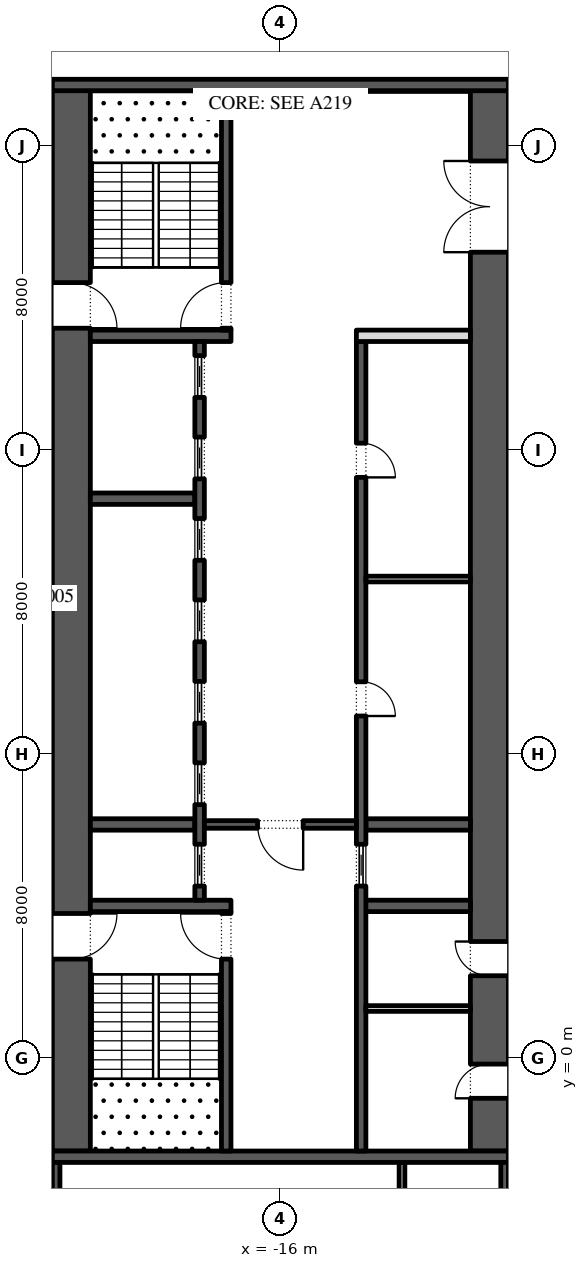
"""IFC4 building model, lengths in metres.
Left out: names, types, materials, properties, quantities, classifications, styles, units other than length and angle.
Written with IfcOpenShell. Run it as: python <this file> out.ifc"""

import sys

from ifc_helpers import new_model, si_unit, direction, frame, frame_2d, origin, place, context, subcontext, project, spatial, rectangle, extrude, element, fill, save


model = new_model("IFC4")
c1 = context("Model", 3, precision=1e-05, world=origin(), true_north=direction((0.0, 1.0)))
c2 = subcontext(c1, "Body", "Model", "MODEL_VIEW")
j1 = project(units=[si_unit("LENGTHUNIT", "METRE"), si_unit("PLANEANGLEUNIT", "RADIAN")], contexts=[c1])
p1 = place(None, origin())
s1 = spatial("IfcSite", under=j1, at=p1, CompositionType="ELEMENT")
p2 = place(p1, origin())
s2 = spatial("IfcBuilding", under=s1, at=p2, CompositionType="ELEMENT")
p3 = place(p2, frame((0.0, 0.0, 77.4)))
s3 = spatial("IfcBuildingStorey", under=s2, at=p3, CompositionType="ELEMENT", Elevation=77.4)
p4 = place(p3, frame((-21.5, -2.45, 0.0), z_axis=(0.0, 0.0, 1.0), x_axis=(0.0, 1.0, 0.0)))
e1 = element("IfcWall", 1, at=p4, inside=s3, PredefinedType="SHEAR", context=c2, shape_type="SweptSolid", body=[
    extrude(rectangle(XDim=27.9, YDim=1.0, at=frame_2d((13.95, 0.0))), origin(), (0.0, 0.0, 1.0), 4.0),
])
p5 = place(p4, frame((5.05, 0.0, 0.0)))
e2 = element("IfcOpeningElement", 2, at=p5, cuts=e1, PredefinedType="OPENING", context=c2, shape_type="SweptSolid", body=[
    extrude(rectangle(XDim=1.2, YDim=2.1, at=frame_2d((0.6, 1.05))), frame((0.0, 0.51, 0.0), z_axis=(0.0, -1.0, 0.0), x_axis=(1.0, 0.0, 0.0)), (0.0, 0.0, 1.0), 1.02),
])
p6 = place(p4, frame((21.65, 0.0, 0.0)))
e3 = element("IfcOpeningElement", 3, at=p6, cuts=e1, PredefinedType="OPENING", context=c2, shape_type="SweptSolid", body=[
    extrude(rectangle(XDim=1.2, YDim=2.1, at=frame_2d((0.6, 1.05))), frame((0.0, 0.51, 0.0), z_axis=(0.0, -1.0, 0.0), x_axis=(1.0, 0.0, 0.0)), (0.0, 0.0, 1.0), 1.02),
])
p7 = place(p3, frame((-10.5, -2.45, 0.0), z_axis=(0.0, 0.0, 1.0), x_axis=(0.0, 1.0, 0.0)))
e4 = element("IfcWall", 4, at=p7, inside=s3, PredefinedType="SHEAR", context=c2, shape_type="SweptSolid", body=[
    extrude(rectangle(XDim=27.9, YDim=1.0, at=frame_2d((13.95, 0.0))), origin(), (0.0, 0.0, 1.0), 4.0),
])
p8 = place(p7, frame((23.65, 0.0, 0.0)))
e5 = element("IfcOpeningElement", 5, at=p8, cuts=e4, PredefinedType="OPENING", context=c2, shape_type="SweptSolid", body=[
    extrude(rectangle(XDim=2.4, YDim=2.1, at=frame_2d((1.2, 1.05))), frame((0.0, 0.51, 0.0), z_axis=(0.0, -1.0, 0.0), x_axis=(1.0, 0.0, 0.0)), (0.0, 0.0, 1.0), 1.02),
])
p9 = place(p7, frame((1.387, 0.0, 0.0)))
e6 = element("IfcOpeningElement", 6, at=p9, cuts=e4, PredefinedType="OPENING", context=c2, shape_type="SweptSolid", body=[
    extrude(rectangle(XDim=0.9, YDim=2.1, at=frame_2d((0.45, 1.05))), frame((0.0, 0.51, 0.0), z_axis=(0.0, -1.0, 0.0), x_axis=(1.0, 0.0, 0.0)), (0.0, 0.0, 1.0), 1.02),
])
p10 = place(p7, frame((4.613, 0.0, 0.0)))
e7 = element("IfcOpeningElement", 7, at=p10, cuts=e4, PredefinedType="OPENING", context=c2, shape_type="SweptSolid", body=[
    extrude(rectangle(XDim=0.9, YDim=2.1, at=frame_2d((0.45, 1.05))), frame((0.0, 0.51, 0.0), z_axis=(0.0, -1.0, 0.0), x_axis=(1.0, 0.0, 0.0)), (0.0, 0.0, 1.0), 1.02),
])
for number, where, z_axis, x_axis in (
    (8, (-22.0, -2.6, 0.0), (0.0, 0.0, 1.0), (1.0, 0.0, 0.0)),
    (9, (-22.0, 25.6, 0.0), (0.0, 0.0, 1.0), (1.0, 0.0, 0.0)),
):
    element("IfcWall", number, at=place(p3, frame(where, z_axis=z_axis, x_axis=x_axis)), inside=s3, PredefinedType="SHEAR", context=c2, shape_type="SweptSolid", body=[
        extrude(rectangle(XDim=12.0, YDim=0.3, at=frame_2d((6.0, 0.0))), origin(), (0.0, 0.0, 1.0), 4.0),
    ])
p11 = place(p3, frame((-21.0, 4.0, 0.0), z_axis=(0.0, 0.0, 1.0), x_axis=(1.0, 0.0, 0.0)))
e10 = element("IfcWall", 10, at=p11, inside=s3, PredefinedType="SHEAR", context=c2, shape_type="SweptSolid", body=[
    extrude(rectangle(XDim=3.7, YDim=0.3, at=frame_2d((1.85, 0.0))), origin(), (0.0, 0.0, 1.0), 4.0),
])
p12 = place(p3, frame((-17.425, -2.45, 0.0), z_axis=(0.0, 0.0, 1.0), x_axis=(0.0, 1.0, 0.0)))
e11 = element("IfcWall", 11, at=p12, inside=s3, PredefinedType="SHEAR", context=c2, shape_type="SweptSolid", body=[
    extrude(rectangle(XDim=6.3, YDim=0.25, at=frame_2d((3.15, 0.0))), origin(), (0.0, 0.0, 1.0), 4.0),
])
p13 = place(p12, frame((5.05, 0.0, 0.0)))
e12 = element("IfcOpeningElement", 12, at=p13, cuts=e11, PredefinedType="OPENING", context=c2, shape_type="SweptSolid", body=[
    extrude(rectangle(XDim=1.2, YDim=2.1, at=frame_2d((0.6, 1.05))), frame((0.0, 0.135, 0.0), z_axis=(0.0, -1.0, 0.0), x_axis=(1.0, 0.0, 0.0)), (0.0, 0.0, 1.0), 0.27),
])
p14 = place(p3, frame((-21.0, 19.0, 0.0), z_axis=(0.0, 0.0, 1.0), x_axis=(1.0, 0.0, 0.0)))
e13 = element("IfcWall", 13, at=p14, inside=s3, PredefinedType="SHEAR", context=c2, shape_type="SweptSolid", body=[
    extrude(rectangle(XDim=3.7, YDim=0.3, at=frame_2d((1.85, 0.0))), origin(), (0.0, 0.0, 1.0), 4.0),
])
p15 = place(p3, frame((-17.425, 19.15, 0.0), z_axis=(0.0, 0.0, 1.0), x_axis=(0.0, 1.0, 0.0)))
e14 = element("IfcWall", 14, at=p15, inside=s3, PredefinedType="SHEAR", context=c2, shape_type="SweptSolid", body=[
    extrude(rectangle(XDim=6.3, YDim=0.25, at=frame_2d((3.15, 0.0))), origin(), (0.0, 0.0, 1.0), 4.0),
])
p16 = place(p15, frame((0.05, 0.0, 0.0)))
e15 = element("IfcOpeningElement", 15, at=p16, cuts=e14, PredefinedType="OPENING", context=c2, shape_type="SweptSolid", body=[
    extrude(rectangle(XDim=1.2, YDim=2.1, at=frame_2d((0.6, 1.05))), frame((0.0, 0.135, 0.0), z_axis=(0.0, -1.0, 0.0), x_axis=(1.0, 0.0, 0.0)), (0.0, 0.0, 1.0), 0.27),
])
for number, where, z_axis, x_axis in (
    (16, (-21.0, 6.143, 0.0), (0.0, 0.0, 1.0), (1.0, 0.0, 0.0)),
    (17, (-21.0, 14.714, 0.0), (0.0, 0.0, 1.0), (1.0, 0.0, 0.0)),
):
    element("IfcWall", number, at=place(p3, frame(where, z_axis=z_axis, x_axis=x_axis)), inside=s3, PredefinedType="SHEAR", context=c2, shape_type="SweptSolid", body=[
        extrude(rectangle(XDim=2.75, YDim=0.3, at=frame_2d((1.375, 0.0))), origin(), (0.0, 0.0, 1.0), 4.0),
    ])
p17 = place(p3, frame((-18.125, 4.15, 0.0), z_axis=(0.0, 0.0, 1.0), x_axis=(0.0, 1.0, 0.0)))
e18 = element("IfcWall", 18, at=p17, inside=s3, PredefinedType="SHEAR", context=c2, shape_type="SweptSolid", body=[
    extrude(rectangle(XDim=14.7, YDim=0.25, at=frame_2d((7.35, 0.0))), origin(), (0.0, 0.0, 1.0), 4.0),
])
p18 = place(p17, frame((0.371, 0.0, 0.0)))
e19 = element("IfcOpeningElement", 19, at=p18, cuts=e18, PredefinedType="OPENING", context=c2, shape_type="SweptSolid", body=[
    extrude(rectangle(XDim=1.1, YDim=2.1, at=frame_2d((0.55, 1.05))), frame((0.0, 0.135, 0.0), z_axis=(0.0, -1.0, 0.0), x_axis=(1.0, 0.0, 0.0)), (0.0, 0.0, 1.0), 0.27),
])
p19 = place(p17, frame((2.514, 0.0, 0.0)))
e20 = element("IfcOpeningElement", 20, at=p19, cuts=e18, PredefinedType="OPENING", context=c2, shape_type="SweptSolid", body=[
    extrude(rectangle(XDim=1.1, YDim=2.1, at=frame_2d((0.55, 1.05))), frame((0.0, 0.135, 0.0), z_axis=(0.0, -1.0, 0.0), x_axis=(1.0, 0.0, 0.0)), (0.0, 0.0, 1.0), 0.27),
])
p20 = place(p17, frame((4.657, 0.0, 0.0)))
e21 = element("IfcOpeningElement", 21, at=p20, cuts=e18, PredefinedType="OPENING", context=c2, shape_type="SweptSolid", body=[
    extrude(rectangle(XDim=1.1, YDim=2.1, at=frame_2d((0.55, 1.05))), frame((0.0, 0.135, 0.0), z_axis=(0.0, -1.0, 0.0), x_axis=(1.0, 0.0, 0.0)), (0.0, 0.0, 1.0), 0.27),
])
p21 = place(p17, frame((6.8, 0.0, 0.0)))
e22 = element("IfcOpeningElement", 22, at=p21, cuts=e18, PredefinedType="OPENING", context=c2, shape_type="SweptSolid", body=[
    extrude(rectangle(XDim=1.1, YDim=2.1, at=frame_2d((0.55, 1.05))), frame((0.0, 0.135, 0.0), z_axis=(0.0, -1.0, 0.0), x_axis=(1.0, 0.0, 0.0)), (0.0, 0.0, 1.0), 0.27),
])
p22 = place(p17, frame((8.943, 0.0, 0.0)))
e23 = element("IfcOpeningElement", 23, at=p22, cuts=e18, PredefinedType="OPENING", context=c2, shape_type="SweptSolid", body=[
    extrude(rectangle(XDim=1.1, YDim=2.1, at=frame_2d((0.55, 1.05))), frame((0.0, 0.135, 0.0), z_axis=(0.0, -1.0, 0.0), x_axis=(1.0, 0.0, 0.0)), (0.0, 0.0, 1.0), 0.27),
])
p23 = place(p17, frame((11.086, 0.0, 0.0)))
e24 = element("IfcOpeningElement", 24, at=p23, cuts=e18, PredefinedType="OPENING", context=c2, shape_type="SweptSolid", body=[
    extrude(rectangle(XDim=1.1, YDim=2.1, at=frame_2d((0.55, 1.05))), frame((0.0, 0.135, 0.0), z_axis=(0.0, -1.0, 0.0), x_axis=(1.0, 0.0, 0.0)), (0.0, 0.0, 1.0), 0.27),
])
p24 = place(p17, frame((13.229, 0.0, 0.0)))
e25 = element("IfcOpeningElement", 25, at=p24, cuts=e18, PredefinedType="OPENING", context=c2, shape_type="SweptSolid", body=[
    extrude(rectangle(XDim=1.1, YDim=2.1, at=frame_2d((0.55, 1.05))), frame((0.0, 0.135, 0.0), z_axis=(0.0, -1.0, 0.0), x_axis=(1.0, 0.0, 0.0)), (0.0, 0.0, 1.0), 0.27),
])
p25 = place(p3, frame((-14.0, 4.0, 0.0), z_axis=(0.0, 0.0, 1.0), x_axis=(1.0, 0.0, 0.0)))
e26 = element("IfcWall", 26, at=p25, inside=s3, PredefinedType="SHEAR", context=c2, shape_type="SweptSolid", body=[
    extrude(rectangle(XDim=3.0, YDim=0.3, at=frame_2d((1.5, 0.0))), origin(), (0.0, 0.0, 1.0), 4.0),
])
p26 = place(p3, frame((-13.75, 6.143, 0.0), z_axis=(0.0, 0.0, 1.0), x_axis=(1.0, 0.0, 0.0)))
e27 = element("IfcWall", 27, at=p26, inside=s3, PredefinedType="SHEAR", context=c2, shape_type="SweptSolid", body=[
    extrude(rectangle(XDim=2.75, YDim=0.3, at=frame_2d((1.375, 0.0))), origin(), (0.0, 0.0, 1.0), 4.0),
])
p27 = place(p3, frame((-13.875, -2.45, 0.0), z_axis=(0.0, 0.0, 1.0), x_axis=(0.0, 1.0, 0.0)))
e28 = element("IfcWall", 28, at=p27, inside=s3, PredefinedType="SHEAR", context=c2, shape_type="SweptSolid", body=[
    extrude(rectangle(XDim=21.3, YDim=0.25, at=frame_2d((10.65, 0.0))), origin(), (0.0, 0.0, 1.0), 4.0),
])
p28 = place(p27, frame((11.446, 0.0, 0.0)))
e29 = element("IfcOpeningElement", 29, at=p28, cuts=e28, PredefinedType="OPENING", context=c2, shape_type="SweptSolid", body=[
    extrude(rectangle(XDim=0.9, YDim=2.1, at=frame_2d((0.45, 1.05))), frame((0.0, 0.135, 0.0), z_axis=(0.0, -1.0, 0.0), x_axis=(1.0, 0.0, 0.0)), (0.0, 0.0, 1.0), 0.27),
])
p29 = place(p27, frame((17.725, 0.0, 0.0)))
e30 = element("IfcOpeningElement", 30, at=p29, cuts=e28, PredefinedType="OPENING", context=c2, shape_type="SweptSolid", body=[
    extrude(rectangle(XDim=0.9, YDim=2.1, at=frame_2d((0.45, 1.05))), frame((0.0, 0.135, 0.0), z_axis=(0.0, -1.0, 0.0), x_axis=(1.0, 0.0, 0.0)), (0.0, 0.0, 1.0), 0.27),
])
p30 = place(p27, frame((6.971, 0.0, 0.0)))
e31 = element("IfcOpeningElement", 31, at=p30, cuts=e28, PredefinedType="OPENING", context=c2, shape_type="SweptSolid", body=[
    extrude(rectangle(XDim=1.1, YDim=2.1, at=frame_2d((0.55, 1.05))), frame((0.0, 0.135, 0.0), z_axis=(0.0, -1.0, 0.0), x_axis=(1.0, 0.0, 0.0)), (0.0, 0.0, 1.0), 0.27),
])
p31 = place(p3, frame((-14.0, 19.0, 0.0), z_axis=(0.0, 0.0, 1.0), x_axis=(1.0, 0.0, 0.0)))
e32 = element("IfcWall", 32, at=p31, inside=s3, PredefinedType="PARTITIONING", context=c2, shape_type="SweptSolid", body=[
    extrude(rectangle(XDim=3.0, YDim=0.3, at=frame_2d((1.5, 0.0))), origin(), (0.0, 0.0, 1.0), 4.0),
])
p32 = place(p3, frame((-13.75, 12.6, 0.0), z_axis=(0.0, 0.0, 1.0), x_axis=(1.0, 0.0, 0.0)))
e33 = element("IfcWall", 33, at=p32, inside=s3, PredefinedType="PARTITIONING", context=c2, shape_type="SweptSolid", body=[
    extrude(rectangle(XDim=2.75, YDim=0.15, at=frame_2d((1.375, 0.0))), origin(), (0.0, 0.0, 1.0), 4.0),
])
p33 = place(p3, frame((-18.0, 6.143, 0.0), z_axis=(0.0, 0.0, 1.0), x_axis=(1.0, 0.0, 0.0)))
e34 = element("IfcWall", 34, at=p33, inside=s3, PredefinedType="SHEAR", context=c2, shape_type="SweptSolid", body=[
    extrude(rectangle(XDim=4.0, YDim=0.2, at=frame_2d((2.0, 0.0))), origin(), (0.0, 0.0, 1.0), 4.0),
])
p34 = place(p33, frame((1.4, 0.0, 0.0)))
e35 = element("IfcOpeningElement", 35, at=p34, cuts=e34, PredefinedType="OPENING", context=c2, shape_type="SweptSolid", body=[
    extrude(rectangle(XDim=1.2, YDim=2.1, at=frame_2d((0.6, 1.05))), frame((0.0, 0.11, 0.0), z_axis=(0.0, -1.0, 0.0), x_axis=(1.0, 0.0, 0.0)), (0.0, 0.0, 1.0), 0.22),
])
p35 = place(p3, frame((-13.75, 1.3, 0.0), z_axis=(0.0, 0.0, 1.0), x_axis=(1.0, 0.0, 0.0)))
e36 = element("IfcWall", 36, at=p35, inside=s3, PredefinedType="PARTITIONING", context=c2, shape_type="SweptSolid", body=[
    extrude(rectangle(XDim=2.75, YDim=0.15, at=frame_2d((1.375, 0.0))), origin(), (0.0, 0.0, 1.0), 4.0),
])
p36 = place(p3, frame((-21.9, -15.8, 0.0), z_axis=(0.0, 0.0, 1.0), x_axis=(0.0, 1.0, 0.0)))
e37 = element("IfcWall", 37, at=p36, inside=s3, PredefinedType="SHEAR", context=c2, shape_type="SweptSolid", body=[
    extrude(rectangle(XDim=13.05, YDim=0.2, at=frame_2d((6.525, 0.0))), origin(), (0.0, 0.0, 1.0), 4.0),
])
p37 = place(p36, frame((11.087, 0.0, 0.0)))
e38 = element("IfcOpeningElement", 38, at=p37, cuts=e37, PredefinedType="OPENING", context=c2, shape_type="SweptSolid", body=[
    extrude(rectangle(XDim=0.9, YDim=2.1, at=frame_2d((0.45, 1.05))), frame((0.0, 0.11, 0.0), z_axis=(0.0, -1.0, 0.0), x_axis=(1.0, 0.0, 0.0)), (0.0, 0.0, 1.0), 0.22),
])
p38 = place(p3, frame((-10.1, -15.8, 0.0), z_axis=(0.0, 0.0, 1.0), x_axis=(0.0, 1.0, 0.0)))
e39 = element("IfcWall", 39, at=p38, inside=s3, PredefinedType="SHEAR", context=c2, shape_type="SweptSolid", body=[
    extrude(rectangle(XDim=13.05, YDim=0.2, at=frame_2d((6.525, 0.0))), origin(), (0.0, 0.0, 1.0), 4.0),
])
p39 = place(p38, frame((4.488, 0.0, 0.0)))
e40 = element("IfcOpeningElement", 40, at=p39, cuts=e39, PredefinedType="OPENING", context=c2, shape_type="SweptSolid", body=[
    extrude(rectangle(XDim=0.9, YDim=2.1, at=frame_2d((0.45, 1.05))), frame((0.0, 0.11, 0.0), z_axis=(0.0, -1.0, 0.0), x_axis=(1.0, 0.0, 0.0)), (0.0, 0.0, 1.0), 0.22),
])
p40 = place(p38, frame((11.038, 0.0, 0.0)))
e41 = element("IfcOpeningElement", 41, at=p40, cuts=e39, PredefinedType="OPENING", context=c2, shape_type="SweptSolid", body=[
    extrude(rectangle(XDim=1.0, YDim=2.1, at=frame_2d((0.5, 1.05))), frame((0.0, 0.11, 0.0), z_axis=(0.0, -1.0, 0.0), x_axis=(1.0, 0.0, 0.0)), (0.0, 0.0, 1.0), 0.22),
])
p41 = place(p3, frame((-12.8, -5.775, 0.0), z_axis=(0.0, 0.0, 1.0), x_axis=(0.0, 1.0, 0.0)))
e42 = element("IfcWall", 42, at=p41, inside=s3, PredefinedType="PARTITIONING", context=c2, shape_type="SweptSolid", body=[
    extrude(rectangle(XDim=3.025, YDim=0.15, at=frame_2d((1.512, 0.0))), origin(), (0.0, 0.0, 1.0), 4.0),
])
p42 = place(p18, origin())
e43 = element("IfcDoor", 43, at=p42, inside=s3, OperationType="SLIDING_TO_LEFT", PredefinedType="DOOR", context=c2, shape_type="SweptSolid", body=[
    extrude(rectangle(XDim=1.1, YDim=2.1, at=frame_2d((0.55, 1.05))), frame((0.0, 0.025, 0.0), z_axis=(0.0, -1.0, 0.0), x_axis=(1.0, 0.0, 0.0)), (0.0, 0.0, 1.0), 0.05),
])
fill(e19, e43)
p43 = place(p19, origin())
e44 = element("IfcDoor", 44, at=p43, inside=s3, OperationType="SLIDING_TO_LEFT", PredefinedType="DOOR", context=c2, shape_type="SweptSolid", body=[
    extrude(rectangle(XDim=1.1, YDim=2.1, at=frame_2d((0.55, 1.05))), frame((0.0, 0.025, 0.0), z_axis=(0.0, -1.0, 0.0), x_axis=(1.0, 0.0, 0.0)), (0.0, 0.0, 1.0), 0.05),
])
fill(e20, e44)
p44 = place(p20, origin())
e45 = element("IfcDoor", 45, at=p44, inside=s3, OperationType="SLIDING_TO_LEFT", PredefinedType="DOOR", context=c2, shape_type="SweptSolid", body=[
    extrude(rectangle(XDim=1.1, YDim=2.1, at=frame_2d((0.55, 1.05))), frame((0.0, 0.025, 0.0), z_axis=(0.0, -1.0, 0.0), x_axis=(1.0, 0.0, 0.0)), (0.0, 0.0, 1.0), 0.05),
])
fill(e21, e45)
p45 = place(p21, origin())
e46 = element("IfcDoor", 46, at=p45, inside=s3, OperationType="SLIDING_TO_LEFT", PredefinedType="DOOR", context=c2, shape_type="SweptSolid", body=[
    extrude(rectangle(XDim=1.1, YDim=2.1, at=frame_2d((0.55, 1.05))), frame((0.0, 0.025, 0.0), z_axis=(0.0, -1.0, 0.0), x_axis=(1.0, 0.0, 0.0)), (0.0, 0.0, 1.0), 0.05),
])
fill(e22, e46)
p46 = place(p22, origin())
e47 = element("IfcDoor", 47, at=p46, inside=s3, OperationType="SLIDING_TO_LEFT", PredefinedType="DOOR", context=c2, shape_type="SweptSolid", body=[
    extrude(rectangle(XDim=1.1, YDim=2.1, at=frame_2d((0.55, 1.05))), frame((0.0, 0.025, 0.0), z_axis=(0.0, -1.0, 0.0), x_axis=(1.0, 0.0, 0.0)), (0.0, 0.0, 1.0), 0.05),
])
fill(e23, e47)
p47 = place(p23, origin())
e48 = element("IfcDoor", 48, at=p47, inside=s3, OperationType="SLIDING_TO_LEFT", PredefinedType="DOOR", context=c2, shape_type="SweptSolid", body=[
    extrude(rectangle(XDim=1.1, YDim=2.1, at=frame_2d((0.55, 1.05))), frame((0.0, 0.025, 0.0), z_axis=(0.0, -1.0, 0.0), x_axis=(1.0, 0.0, 0.0)), (0.0, 0.0, 1.0), 0.05),
])
fill(e24, e48)
p48 = place(p24, origin())
e49 = element("IfcDoor", 49, at=p48, inside=s3, OperationType="SLIDING_TO_LEFT", PredefinedType="DOOR", context=c2, shape_type="SweptSolid", body=[
    extrude(rectangle(XDim=1.1, YDim=2.1, at=frame_2d((0.55, 1.05))), frame((0.0, 0.025, 0.0), z_axis=(0.0, -1.0, 0.0), x_axis=(1.0, 0.0, 0.0)), (0.0, 0.0, 1.0), 0.05),
])
fill(e25, e49)
p49 = place(p28, frame((0.9, -0.2, 0.0), z_axis=(0.0, 0.0, 1.0), x_axis=(-1.0, 0.0, 0.0)))
e50 = element("IfcDoor", 50, at=p49, inside=s3, OperationType="SINGLE_SWING_LEFT", PredefinedType="DOOR", context=c2, shape_type="SweptSolid", body=[
    extrude(rectangle(XDim=0.9, YDim=2.1, at=frame_2d((0.45, 1.05))), frame((0.0, -0.075, 0.0), z_axis=(0.0, -1.0, 0.0), x_axis=(1.0, 0.0, 0.0)), (0.0, 0.0, 1.0), 0.05),
])
fill(e29, e50)
p50 = place(p29, frame((0.9, -0.2, 0.0), z_axis=(0.0, 0.0, 1.0), x_axis=(-1.0, 0.0, 0.0)))
e51 = element("IfcDoor", 51, at=p50, inside=s3, OperationType="SINGLE_SWING_LEFT", PredefinedType="DOOR", context=c2, shape_type="SweptSolid", body=[
    extrude(rectangle(XDim=0.9, YDim=2.1, at=frame_2d((0.45, 1.05))), frame((0.0, -0.075, 0.0), z_axis=(0.0, -1.0, 0.0), x_axis=(1.0, 0.0, 0.0)), (0.0, 0.0, 1.0), 0.05),
])
fill(e30, e51)
p51 = place(p30, origin())
e52 = element("IfcDoor", 52, at=p51, inside=s3, OperationType="SLIDING_TO_LEFT", PredefinedType="DOOR", context=c2, shape_type="SweptSolid", body=[
    extrude(rectangle(XDim=1.1, YDim=2.1, at=frame_2d((0.55, 1.05))), frame((0.0, 0.025, 0.0), z_axis=(0.0, -1.0, 0.0), x_axis=(1.0, 0.0, 0.0)), (0.0, 0.0, 1.0), 0.05),
])
fill(e31, e52)
p52 = place(p34, frame((1.2, 0.0, 0.0), z_axis=(0.0, 0.0, 1.0), x_axis=(-1.0, 0.0, 0.0)))
e53 = element("IfcDoor", 53, at=p52, inside=s3, OperationType="SINGLE_SWING_RIGHT", PredefinedType="DOOR", context=c2, shape_type="SweptSolid", body=[
    extrude(rectangle(XDim=1.2, YDim=2.1, at=frame_2d((0.6, 1.05))), frame((0.0, 0.025, 0.0), z_axis=(0.0, -1.0, 0.0), x_axis=(1.0, 0.0, 0.0)), (0.0, 0.0, 1.0), 0.05),
])
fill(e35, e53)
p53 = place(p8, origin())
e54 = element("IfcDoor", 54, at=p53, inside=s3, OperationType="DOUBLE_DOOR_SINGLE_SWING", PredefinedType="DOOR", context=c2, shape_type="SweptSolid", body=[
    extrude(rectangle(XDim=2.4, YDim=2.1, at=frame_2d((1.2, 1.05))), frame((0.0, 0.025, 0.0), z_axis=(0.0, -1.0, 0.0), x_axis=(1.0, 0.0, 0.0)), (0.0, 0.0, 1.0), 0.05),
])
fill(e5, e54)
p54 = place(p13, origin())
e55 = element("IfcDoor", 55, at=p54, inside=s3, OperationType="SINGLE_SWING_LEFT", PredefinedType="DOOR", context=c2, shape_type="SweptSolid", body=[
    extrude(rectangle(XDim=1.2, YDim=2.1, at=frame_2d((0.6, 1.05))), frame((0.0, 0.025, 0.0), z_axis=(0.0, -1.0, 0.0), x_axis=(1.0, 0.0, 0.0)), (0.0, 0.0, 1.0), 0.05),
])
fill(e12, e55)
p55 = place(p5, frame((1.2, 0.0, 0.0), z_axis=(0.0, 0.0, 1.0), x_axis=(-1.0, 0.0, 0.0)))
e56 = element("IfcDoor", 56, at=p55, inside=s3, OperationType="SINGLE_SWING_RIGHT", PredefinedType="DOOR", context=c2, shape_type="SweptSolid", body=[
    extrude(rectangle(XDim=1.2, YDim=2.1, at=frame_2d((0.6, 1.05))), frame((0.0, 0.025, 0.0), z_axis=(0.0, -1.0, 0.0), x_axis=(1.0, 0.0, 0.0)), (0.0, 0.0, 1.0), 0.05),
])
fill(e2, e56)
p56 = place(p16, origin())
e57 = element("IfcDoor", 57, at=p56, inside=s3, OperationType="SINGLE_SWING_RIGHT", PredefinedType="DOOR", context=c2, shape_type="SweptSolid", body=[
    extrude(rectangle(XDim=1.2, YDim=2.1, at=frame_2d((0.6, 1.05))), frame((0.0, 0.025, 0.0), z_axis=(0.0, -1.0, 0.0), x_axis=(1.0, 0.0, 0.0)), (0.0, 0.0, 1.0), 0.05),
])
fill(e15, e57)
p57 = place(p6, frame((1.2, 0.0, 0.0), z_axis=(0.0, 0.0, 1.0), x_axis=(-1.0, 0.0, 0.0)))
e58 = element("IfcDoor", 58, at=p57, inside=s3, OperationType="SINGLE_SWING_LEFT", PredefinedType="DOOR", context=c2, shape_type="SweptSolid", body=[
    extrude(rectangle(XDim=1.2, YDim=2.1, at=frame_2d((0.6, 1.05))), frame((0.0, 0.025, 0.0), z_axis=(0.0, -1.0, 0.0), x_axis=(1.0, 0.0, 0.0)), (0.0, 0.0, 1.0), 0.05),
])
fill(e3, e58)
p58 = place(p9, origin())
e59 = element("IfcDoor", 59, at=p58, inside=s3, OperationType="SINGLE_SWING_RIGHT", PredefinedType="DOOR", context=c2, shape_type="SweptSolid", body=[
    extrude(rectangle(XDim=0.9, YDim=2.1, at=frame_2d((0.45, 1.05))), frame((0.0, 0.5, 0.0), z_axis=(0.0, -1.0, 0.0), x_axis=(1.0, 0.0, 0.0)), (0.0, 0.0, 1.0), 0.05),
])
fill(e6, e59)
p59 = place(p10, origin())
e60 = element("IfcDoor", 60, at=p59, inside=s3, OperationType="SINGLE_SWING_LEFT", PredefinedType="DOOR", context=c2, shape_type="SweptSolid", body=[
    extrude(rectangle(XDim=0.9, YDim=2.1, at=frame_2d((0.45, 1.05))), frame((0.0, 0.5, 0.0), z_axis=(0.0, -1.0, 0.0), x_axis=(1.0, 0.0, 0.0)), (0.0, 0.0, 1.0), 0.05),
])
fill(e7, e60)
save(model, sys.argv[1])
